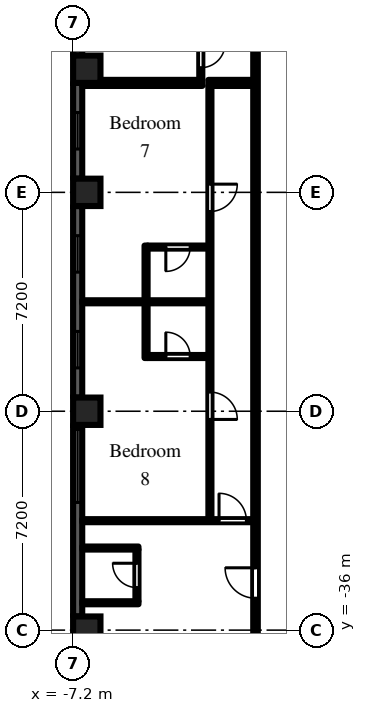
"""IFC4 building model, lengths in metres.
Left out: names, types, materials, properties, quantities, classifications, styles, units other than length and angle.
Written with IfcOpenShell. Run it as: python <this file> out.ifc"""

import sys

from ifc_helpers import new_model, si_unit, direction, frame, frame_2d, origin, origin_2d, place, context, subcontext, project, spatial, rectangle, extrude, element, fill, save


model = new_model("IFC4")
c1 = context("Model", 3, precision=1e-05, world=origin(), true_north=direction((0.0, 1.0)))
c2 = subcontext(c1, "Body", "Model", "MODEL_VIEW")
j1 = project(units=[si_unit("LENGTHUNIT", "METRE"), si_unit("PLANEANGLEUNIT", "RADIAN")], contexts=[c1])
p1 = place(None, origin())
s1 = spatial("IfcSite", under=j1, at=p1, CompositionType="ELEMENT")
p2 = place(p1, origin())
s2 = spatial("IfcBuilding", under=s1, at=p2, CompositionType="ELEMENT")
p3 = place(p2, frame((0.0, 0.0, 59.7)))
s3 = spatial("IfcBuildingStorey", under=s2, at=p3, CompositionType="ELEMENT", Elevation=59.7)
for number, where, z_axis, x_axis in (
    (1, (-6.75, -36.0, 0.0), (0.0, 0.0, 1.0), (1.0, 0.0, 0.0)),
    (2, (-6.75, -28.8, 0.0), (0.0, 0.0, 1.0), (1.0, 0.0, 0.0)),
    (3, (-6.75, -21.6, 0.0), (0.0, 0.0, 1.0), (1.0, 0.0, 0.0)),
    (4, (-6.75, -17.55, 0.0), (0.0, 0.0, 1.0), (1.0, 0.0, 0.0)),
):
    element("IfcColumn", number, at=place(p3, frame(where, z_axis=z_axis, x_axis=x_axis)), inside=s3, PredefinedType="COLUMN", context=c2, shape_type="SweptSolid", body=[
        extrude(rectangle(XDim=0.9, YDim=0.9, at=origin_2d()), origin(), (0.0, 0.0, 1.0), 3.0),
    ])
p4 = place(p3, frame((-7.05, -15.3, 0.0), z_axis=(0.0, 0.0, 1.0), x_axis=(0.0, -1.0, 0.0)))
e5 = element("IfcWall", 5, at=p4, inside=s3, PredefinedType="SOLIDWALL", context=c2, shape_type="SweptSolid", body=[
    extrude(rectangle(XDim=1.8, YDim=0.3, at=frame_2d((0.9, 0.0))), origin(), (0.0, 0.0, 1.0), 2.1),
])
p5 = place(p4, frame((0.3, 0.0, 0.2)))
e6 = element("IfcOpeningElement", 6, at=p5, cuts=e5, PredefinedType="OPENING", context=c2, shape_type="SweptSolid", body=[
    extrude(rectangle(XDim=1.2, YDim=1.85, at=frame_2d((0.6, 0.925))), frame((0.0, 0.16, 0.0), z_axis=(0.0, -1.0, 0.0), x_axis=(1.0, 0.0, 0.0)), (0.0, 0.0, 1.0), 0.32),
])
p6 = place(p3, frame((-7.05, -18.0, 0.0), z_axis=(0.0, 0.0, 1.0), x_axis=(0.0, -1.0, 0.0)))
e7 = element("IfcWall", 7, at=p6, inside=s3, PredefinedType="SOLIDWALL", context=c2, shape_type="SweptSolid", body=[
    extrude(rectangle(XDim=3.15, YDim=0.3, at=frame_2d((1.575, 0.0))), origin(), (0.0, 0.0, 1.0), 2.1),
])
p7 = place(p6, frame((0.975, 0.0, 0.2)))
e8 = element("IfcOpeningElement", 8, at=p7, cuts=e7, PredefinedType="OPENING", context=c2, shape_type="SweptSolid", body=[
    extrude(rectangle(XDim=1.2, YDim=1.85, at=frame_2d((0.6, 0.925))), frame((0.0, 0.16, 0.0), z_axis=(0.0, -1.0, 0.0), x_axis=(1.0, 0.0, 0.0)), (0.0, 0.0, 1.0), 0.32),
])
p8 = place(p3, frame((-7.05, -22.05, 0.0), z_axis=(0.0, 0.0, 1.0), x_axis=(0.0, -1.0, 0.0)))
e9 = element("IfcWall", 9, at=p8, inside=s3, PredefinedType="SOLIDWALL", context=c2, shape_type="SweptSolid", body=[
    extrude(rectangle(XDim=6.3, YDim=0.3, at=frame_2d((3.15, 0.0))), origin(), (0.0, 0.0, 1.0), 2.1),
])
p9 = place(p8, frame((0.975, 0.0, 0.2)))
e10 = element("IfcOpeningElement", 10, at=p9, cuts=e9, PredefinedType="OPENING", context=c2, shape_type="SweptSolid", body=[
    extrude(rectangle(XDim=1.2, YDim=1.85, at=frame_2d((0.6, 0.925))), frame((0.0, 0.16, 0.0), z_axis=(0.0, -1.0, 0.0), x_axis=(1.0, 0.0, 0.0)), (0.0, 0.0, 1.0), 0.32),
])
p10 = place(p8, frame((4.125, 0.0, 0.2)))
e11 = element("IfcOpeningElement", 11, at=p10, cuts=e9, PredefinedType="OPENING", context=c2, shape_type="SweptSolid", body=[
    extrude(rectangle(XDim=1.2, YDim=1.85, at=frame_2d((0.6, 0.925))), frame((0.0, 0.16, 0.0), z_axis=(0.0, -1.0, 0.0), x_axis=(1.0, 0.0, 0.0)), (0.0, 0.0, 1.0), 0.32),
])
p11 = place(p3, frame((-7.05, -29.25, 0.0), z_axis=(0.0, 0.0, 1.0), x_axis=(0.0, -1.0, 0.0)))
e12 = element("IfcWall", 12, at=p11, inside=s3, PredefinedType="SOLIDWALL", context=c2, shape_type="SweptSolid", body=[
    extrude(rectangle(XDim=6.3, YDim=0.3, at=frame_2d((3.15, 0.0))), origin(), (0.0, 0.0, 1.0), 2.1),
])
p12 = place(p11, frame((0.15, 0.0, 0.2)))
e13 = element("IfcOpeningElement", 13, at=p12, cuts=e12, PredefinedType="OPENING", context=c2, shape_type="SweptSolid", body=[
    extrude(rectangle(XDim=2.4, YDim=1.85, at=frame_2d((1.2, 0.925))), frame((0.0, 0.16, 0.0), z_axis=(0.0, -1.0, 0.0), x_axis=(1.0, 0.0, 0.0)), (0.0, 0.0, 1.0), 0.32),
])
for number, where, z_axis, x_axis in (
    (14, (-6.9, -35.1, 0.0), (0.0, 0.0, 1.0), (1.0, 0.0, 0.0)),
    (15, (-6.9, -33.3, 0.0), (0.0, 0.0, 1.0), (1.0, 0.0, 0.0)),
):
    element("IfcWall", number, at=place(p3, frame(where, z_axis=z_axis, x_axis=x_axis)), inside=s3, PredefinedType="PARTITIONING", context=c2, shape_type="SweptSolid", body=[
        extrude(rectangle(XDim=1.85, YDim=0.1, at=frame_2d((0.925, 0.0))), origin(), (0.0, 0.0, 1.0), 2.55),
    ])
p13 = place(p3, frame((-6.9, -32.4, 0.0), z_axis=(0.0, 0.0, 1.0), x_axis=(1.0, 0.0, 0.0)))
e16 = element("IfcWall", 16, at=p13, inside=s3, PredefinedType="PARTITIONING", context=c2, shape_type="SweptSolid", body=[
    extrude(rectangle(XDim=5.625, YDim=0.1, at=frame_2d((2.812, 0.0))), origin(), (0.0, 0.0, 1.0), 2.55),
])
p14 = place(p13, frame((4.5, 0.0, 0.0)))
e17 = element("IfcOpeningElement", 17, at=p14, cuts=e16, PredefinedType="OPENING", context=c2, shape_type="SweptSolid", body=[
    extrude(rectangle(XDim=0.9, YDim=2.1, at=frame_2d((0.45, 1.05))), frame((0.0, 0.06, 0.0), z_axis=(0.0, -1.0, 0.0), x_axis=(1.0, 0.0, 0.0)), (0.0, 0.0, 1.0), 0.12),
])
p15 = place(p3, frame((-6.9, -25.2, 0.0), z_axis=(0.0, 0.0, 1.0), x_axis=(1.0, 0.0, 0.0)))
e18 = element("IfcWall", 18, at=p15, inside=s3, PredefinedType="PARTITIONING", context=c2, shape_type="SweptSolid", body=[
    extrude(rectangle(XDim=4.15, YDim=0.1, at=frame_2d((2.075, 0.0))), origin(), (0.0, 0.0, 1.0), 2.55),
])
p16 = place(p3, frame((-6.9, -18.0, 0.0), z_axis=(0.0, 0.0, 1.0), x_axis=(1.0, 0.0, 0.0)))
e19 = element("IfcWall", 19, at=p16, inside=s3, PredefinedType="PARTITIONING", context=c2, shape_type="SweptSolid", body=[
    extrude(rectangle(XDim=3.95, YDim=0.2, at=frame_2d((1.975, 0.0))), origin(), (0.0, 0.0, 1.0), 2.55),
])
p17 = place(p3, frame((-5.1, -35.05, 0.0), z_axis=(0.0, 0.0, 1.0), x_axis=(0.0, 1.0, 0.0)))
e20 = element("IfcWall", 20, at=p17, inside=s3, PredefinedType="PARTITIONING", context=c2, shape_type="SweptSolid", body=[
    extrude(rectangle(XDim=1.7, YDim=0.1, at=frame_2d((0.85, 0.0))), origin(), (0.0, 0.0, 1.0), 2.55),
])
p18 = place(p17, frame((0.45, 0.0, 0.0)))
e21 = element("IfcOpeningElement", 21, at=p18, cuts=e20, PredefinedType="OPENING", context=c2, shape_type="SweptSolid", body=[
    extrude(rectangle(XDim=0.8, YDim=2.1, at=frame_2d((0.4, 1.05))), frame((0.0, 0.06, 0.0), z_axis=(0.0, -1.0, 0.0), x_axis=(1.0, 0.0, 0.0)), (0.0, 0.0, 1.0), 0.12),
])
p19 = place(p3, frame((-4.8, -27.05, 0.0), z_axis=(0.0, 0.0, 1.0), x_axis=(0.0, 1.0, 0.0)))
e22 = element("IfcWall", 22, at=p19, inside=s3, PredefinedType="PARTITIONING", context=c2, shape_type="SweptSolid", body=[
    extrude(rectangle(XDim=3.7, YDim=0.1, at=frame_2d((1.85, 0.0))), origin(), (0.0, 0.0, 1.0), 2.55),
])
p20 = place(p3, frame((-4.75, -27.0, 0.0), z_axis=(0.0, 0.0, 1.0), x_axis=(1.0, 0.0, 0.0)))
e23 = element("IfcWall", 23, at=p20, inside=s3, PredefinedType="PARTITIONING", context=c2, shape_type="SweptSolid", body=[
    extrude(rectangle(XDim=2.0, YDim=0.1, at=frame_2d((1.0, 0.0))), origin(), (0.0, 0.0, 1.0), 2.55),
])
p21 = place(p20, frame((0.6, 0.0, 0.0)))
e24 = element("IfcOpeningElement", 24, at=p21, cuts=e23, PredefinedType="OPENING", context=c2, shape_type="SweptSolid", body=[
    extrude(rectangle(XDim=0.8, YDim=2.1, at=frame_2d((0.4, 1.05))), frame((0.0, 0.06, 0.0), z_axis=(0.0, -1.0, 0.0), x_axis=(1.0, 0.0, 0.0)), (0.0, 0.0, 1.0), 0.12),
])
p22 = place(p3, frame((-4.75, -23.4, 0.0), z_axis=(0.0, 0.0, 1.0), x_axis=(1.0, 0.0, 0.0)))
e25 = element("IfcWall", 25, at=p22, inside=s3, PredefinedType="PARTITIONING", context=c2, shape_type="SweptSolid", body=[
    extrude(rectangle(XDim=2.0, YDim=0.1, at=frame_2d((1.0, 0.0))), origin(), (0.0, 0.0, 1.0), 2.55),
])
p23 = place(p22, frame((0.6, 0.0, 0.0)))
e26 = element("IfcOpeningElement", 26, at=p23, cuts=e25, PredefinedType="OPENING", context=c2, shape_type="SweptSolid", body=[
    extrude(rectangle(XDim=0.8, YDim=2.1, at=frame_2d((0.4, 1.05))), frame((0.0, 0.06, 0.0), z_axis=(0.0, -1.0, 0.0), x_axis=(1.0, 0.0, 0.0)), (0.0, 0.0, 1.0), 0.12),
])
p24 = place(p3, frame((-3.0, -17.9, 0.0), z_axis=(0.0, 0.0, 1.0), x_axis=(0.0, 1.0, 0.0)))
e27 = element("IfcWall", 27, at=p24, inside=s3, PredefinedType="PARTITIONING", context=c2, shape_type="SweptSolid", body=[
    extrude(rectangle(XDim=1.75, YDim=0.1, at=frame_2d((0.875, 0.0))), origin(), (0.0, 0.0, 1.0), 2.55),
])
p25 = place(p24, frame((0.4, 0.0, 0.0)))
e28 = element("IfcOpeningElement", 28, at=p25, cuts=e27, PredefinedType="OPENING", context=c2, shape_type="SweptSolid", body=[
    extrude(rectangle(XDim=0.8, YDim=2.1, at=frame_2d((0.4, 1.05))), frame((0.0, 0.06, 0.0), z_axis=(0.0, -1.0, 0.0), x_axis=(1.0, 0.0, 0.0)), (0.0, 0.0, 1.0), 0.12),
])
p26 = place(p3, frame((-2.7, -32.35, 0.0), z_axis=(0.0, 0.0, 1.0), x_axis=(0.0, 1.0, 0.0)))
e29 = element("IfcWall", 29, at=p26, inside=s3, PredefinedType="PARTITIONING", context=c2, shape_type="SweptSolid", body=[
    extrude(rectangle(XDim=14.25, YDim=0.1, at=frame_2d((7.125, 0.0))), origin(), (0.0, 0.0, 1.0), 2.55),
])
p27 = place(p26, frame((3.28, 0.0, 0.0)))
e30 = element("IfcOpeningElement", 30, at=p27, cuts=e29, PredefinedType="OPENING", context=c2, shape_type="SweptSolid", body=[
    extrude(rectangle(XDim=0.9, YDim=2.1, at=frame_2d((0.45, 1.05))), frame((0.0, 0.06, 0.0), z_axis=(0.0, -1.0, 0.0), x_axis=(1.0, 0.0, 0.0)), (0.0, 0.0, 1.0), 0.12),
])
p28 = place(p26, frame((10.12, 0.0, 0.0)))
e31 = element("IfcOpeningElement", 31, at=p28, cuts=e29, PredefinedType="OPENING", context=c2, shape_type="SweptSolid", body=[
    extrude(rectangle(XDim=0.9, YDim=2.1, at=frame_2d((0.45, 1.05))), frame((0.0, 0.06, 0.0), z_axis=(0.0, -1.0, 0.0), x_axis=(1.0, 0.0, 0.0)), (0.0, 0.0, 1.0), 0.12),
])
p29 = place(p3, frame((-2.75, -18.0, 0.0), z_axis=(0.0, 0.0, 1.0), x_axis=(1.0, 0.0, 0.0)))
e32 = element("IfcWall", 32, at=p29, inside=s3, PredefinedType="PARTITIONING", context=c2, shape_type="SweptSolid", body=[
    extrude(rectangle(XDim=1.475, YDim=0.2, at=frame_2d((0.738, 0.0))), origin(), (0.0, 0.0, 1.0), 2.55),
])
p30 = place(p3, frame((-1.2, -36.5, 0.0), z_axis=(0.0, 0.0, 1.0), x_axis=(0.0, 1.0, 0.0)))
e33 = element("IfcWall", 33, at=p30, inside=s3, PredefinedType="PARTITIONING", context=c2, shape_type="SweptSolid", body=[
    extrude(rectangle(XDim=35.225, YDim=0.15, at=frame_2d((17.613, 0.0))), origin(), (0.0, 0.0, 1.0), 2.55),
])
p31 = place(p30, frame((31.85, 0.0, 0.0)))
e34 = element("IfcOpeningElement", 34, at=p31, cuts=e33, PredefinedType="OPENING", context=c2, shape_type="SweptSolid", body=[
    extrude(rectangle(XDim=0.9, YDim=2.1, at=frame_2d((0.45, 1.05))), frame((0.0, 0.085, 0.0), z_axis=(0.0, -1.0, 0.0), x_axis=(1.0, 0.0, 0.0)), (0.0, 0.0, 1.0), 0.17),
])
p32 = place(p30, frame((23.05, 0.0, 0.0)))
e35 = element("IfcOpeningElement", 35, at=p32, cuts=e33, PredefinedType="OPENING", context=c2, shape_type="SweptSolid", body=[
    extrude(rectangle(XDim=0.9, YDim=2.1, at=frame_2d((0.45, 1.05))), frame((0.0, 0.085, 0.0), z_axis=(0.0, -1.0, 0.0), x_axis=(1.0, 0.0, 0.0)), (0.0, 0.0, 1.0), 0.17),
])
p33 = place(p30, frame((26.65, 0.0, 0.0)))
e36 = element("IfcOpeningElement", 36, at=p33, cuts=e33, PredefinedType="OPENING", context=c2, shape_type="SweptSolid", body=[
    extrude(rectangle(XDim=0.9, YDim=2.1, at=frame_2d((0.45, 1.05))), frame((0.0, 0.085, 0.0), z_axis=(0.0, -1.0, 0.0), x_axis=(1.0, 0.0, 0.0)), (0.0, 0.0, 1.0), 0.17),
])
p34 = place(p30, frame((20.9, 0.0, 0.0)))
e37 = element("IfcOpeningElement", 37, at=p34, cuts=e33, PredefinedType="OPENING", context=c2, shape_type="SweptSolid", body=[
    extrude(rectangle(XDim=1.0, YDim=2.1, at=frame_2d((0.5, 1.05))), frame((0.0, 0.085, 0.0), z_axis=(0.0, -1.0, 0.0), x_axis=(1.0, 0.0, 0.0)), (0.0, 0.0, 1.0), 0.17),
])
p35 = place(p30, frame((1.55, 0.0, 0.0)))
e38 = element("IfcOpeningElement", 38, at=p35, cuts=e33, PredefinedType="OPENING", context=c2, shape_type="SweptSolid", body=[
    extrude(rectangle(XDim=1.0, YDim=2.1, at=frame_2d((0.5, 1.05))), frame((0.0, 0.085, 0.0), z_axis=(0.0, -1.0, 0.0), x_axis=(1.0, 0.0, 0.0)), (0.0, 0.0, 1.0), 0.17),
])
p36 = place(p7, origin())
e39 = element("IfcWindow", 39, at=p36, inside=s3, PartitioningType="SINGLE_PANEL", PredefinedType="WINDOW", context=c2, shape_type="SweptSolid", body=[
    extrude(rectangle(XDim=1.2, YDim=1.85, at=frame_2d((0.6, 0.925))), frame((0.0, 0.03, 0.0), z_axis=(0.0, -1.0, 0.0), x_axis=(1.0, 0.0, 0.0)), (0.0, 0.0, 1.0), 0.06),
])
fill(e8, e39)
p37 = place(p9, origin())
e40 = element("IfcWindow", 40, at=p37, inside=s3, PartitioningType="SINGLE_PANEL", PredefinedType="WINDOW", context=c2, shape_type="SweptSolid", body=[
    extrude(rectangle(XDim=1.2, YDim=1.85, at=frame_2d((0.6, 0.925))), frame((0.0, 0.03, 0.0), z_axis=(0.0, -1.0, 0.0), x_axis=(1.0, 0.0, 0.0)), (0.0, 0.0, 1.0), 0.06),
])
fill(e10, e40)
p38 = place(p10, origin())
e41 = element("IfcWindow", 41, at=p38, inside=s3, PartitioningType="SINGLE_PANEL", PredefinedType="WINDOW", context=c2, shape_type="SweptSolid", body=[
    extrude(rectangle(XDim=1.2, YDim=1.85, at=frame_2d((0.6, 0.925))), frame((0.0, 0.03, 0.0), z_axis=(0.0, -1.0, 0.0), x_axis=(1.0, 0.0, 0.0)), (0.0, 0.0, 1.0), 0.06),
])
fill(e11, e41)
p39 = place(p12, origin())
e42 = element("IfcWindow", 42, at=p39, inside=s3, PartitioningType="SINGLE_PANEL", PredefinedType="WINDOW", context=c2, shape_type="SweptSolid", body=[
    extrude(rectangle(XDim=2.4, YDim=1.85, at=frame_2d((1.2, 0.925))), frame((0.0, 0.03, 0.0), z_axis=(0.0, -1.0, 0.0), x_axis=(1.0, 0.0, 0.0)), (0.0, 0.0, 1.0), 0.06),
])
fill(e13, e42)
p40 = place(p25, frame((0.8, 0.0, 0.0), z_axis=(0.0, 0.0, 1.0), x_axis=(-1.0, 0.0, 0.0)))
e43 = element("IfcDoor", 43, at=p40, inside=s3, OperationType="SINGLE_SWING_LEFT", PredefinedType="DOOR", context=c2, shape_type="SweptSolid", body=[
    extrude(rectangle(XDim=0.8, YDim=2.1, at=frame_2d((0.4, 1.05))), frame((0.0, 0.025, 0.0), z_axis=(0.0, -1.0, 0.0), x_axis=(1.0, 0.0, 0.0)), (0.0, 0.0, 1.0), 0.05),
])
fill(e28, e43)
p41 = place(p18, origin())
e44 = element("IfcDoor", 44, at=p41, inside=s3, OperationType="SINGLE_SWING_RIGHT", PredefinedType="DOOR", context=c2, shape_type="SweptSolid", body=[
    extrude(rectangle(XDim=0.8, YDim=2.1, at=frame_2d((0.4, 1.05))), frame((0.0, 0.025, 0.0), z_axis=(0.0, -1.0, 0.0), x_axis=(1.0, 0.0, 0.0)), (0.0, 0.0, 1.0), 0.05),
])
fill(e21, e44)
p42 = place(p35, origin())
e45 = element("IfcDoor", 45, at=p42, inside=s3, OperationType="SINGLE_SWING_RIGHT", PredefinedType="DOOR", context=c2, shape_type="SweptSolid", body=[
    extrude(rectangle(XDim=1.0, YDim=2.1, at=frame_2d((0.5, 1.05))), frame((0.0, 0.025, 0.0), z_axis=(0.0, -1.0, 0.0), x_axis=(1.0, 0.0, 0.0)), (0.0, 0.0, 1.0), 0.05),
])
fill(e38, e45)
p43 = place(p27, frame((0.9, 0.0, 0.0), z_axis=(0.0, 0.0, 1.0), x_axis=(-1.0, 0.0, 0.0)))
e46 = element("IfcDoor", 46, at=p43, inside=s3, OperationType="SINGLE_SWING_RIGHT", PredefinedType="DOOR", context=c2, shape_type="SweptSolid", body=[
    extrude(rectangle(XDim=0.9, YDim=2.1, at=frame_2d((0.45, 1.05))), frame((0.0, 0.025, 0.0), z_axis=(0.0, -1.0, 0.0), x_axis=(1.0, 0.0, 0.0)), (0.0, 0.0, 1.0), 0.05),
])
fill(e30, e46)
p44 = place(p28, frame((0.9, 0.0, 0.0), z_axis=(0.0, 0.0, 1.0), x_axis=(-1.0, 0.0, 0.0)))
e47 = element("IfcDoor", 47, at=p44, inside=s3, OperationType="SINGLE_SWING_LEFT", PredefinedType="DOOR", context=c2, shape_type="SweptSolid", body=[
    extrude(rectangle(XDim=0.9, YDim=2.1, at=frame_2d((0.45, 1.05))), frame((0.0, 0.025, 0.0), z_axis=(0.0, -1.0, 0.0), x_axis=(1.0, 0.0, 0.0)), (0.0, 0.0, 1.0), 0.05),
])
fill(e31, e47)
p45 = place(p14, origin())
e48 = element("IfcDoor", 48, at=p45, inside=s3, OperationType="SINGLE_SWING_LEFT", PredefinedType="DOOR", context=c2, shape_type="SweptSolid", body=[
    extrude(rectangle(XDim=0.9, YDim=2.1, at=frame_2d((0.45, 1.05))), frame((0.0, 0.025, 0.0), z_axis=(0.0, -1.0, 0.0), x_axis=(1.0, 0.0, 0.0)), (0.0, 0.0, 1.0), 0.05),
])
fill(e17, e48)
p46 = place(p23, frame((0.8, 0.0, 0.0), z_axis=(0.0, 0.0, 1.0), x_axis=(-1.0, 0.0, 0.0)))
e49 = element("IfcDoor", 49, at=p46, inside=s3, OperationType="SINGLE_SWING_RIGHT", PredefinedType="DOOR", context=c2, shape_type="SweptSolid", body=[
    extrude(rectangle(XDim=0.8, YDim=2.1, at=frame_2d((0.4, 1.05))), frame((0.0, 0.025, 0.0), z_axis=(0.0, -1.0, 0.0), x_axis=(1.0, 0.0, 0.0)), (0.0, 0.0, 1.0), 0.05),
])
fill(e26, e49)
p47 = place(p21, origin())
e50 = element("IfcDoor", 50, at=p47, inside=s3, OperationType="SINGLE_SWING_LEFT", PredefinedType="DOOR", context=c2, shape_type="SweptSolid", body=[
    extrude(rectangle(XDim=0.8, YDim=2.1, at=frame_2d((0.4, 1.05))), frame((0.0, 0.025, 0.0), z_axis=(0.0, -1.0, 0.0), x_axis=(1.0, 0.0, 0.0)), (0.0, 0.0, 1.0), 0.05),
])
fill(e24, e50)
save(model, sys.argv[1])
